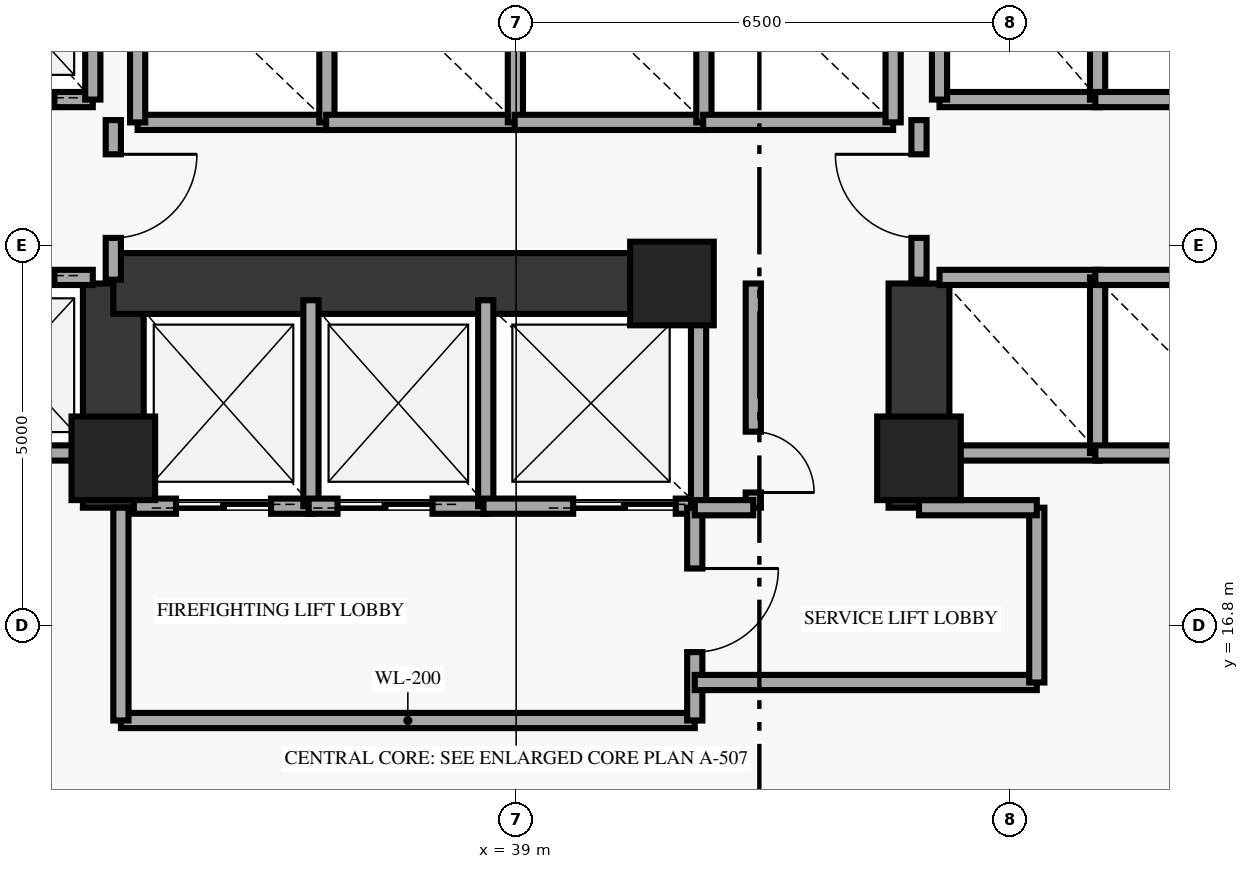
"""IFC4 building model, lengths in metres.
Left out: names, types, materials, properties, quantities, classifications, styles, units other than length and angle.
Written with IfcOpenShell. Run it as: python <this file> out.ifc"""

import sys

from ifc_helpers import new_model, si_unit, direction, frame, frame_2d, origin, origin_2d, place, context, subcontext, project, spatial, rectangle, extrude, element, fill, save


model = new_model("IFC4")
c1 = context("Model", 3, precision=1e-05, world=origin(), true_north=direction((0.0, 1.0)))
c2 = subcontext(c1, "Body", "Model", "MODEL_VIEW")
j1 = project(units=[si_unit("LENGTHUNIT", "METRE"), si_unit("PLANEANGLEUNIT", "RADIAN")], contexts=[c1])
p1 = place(None, origin())
s1 = spatial("IfcSite", under=j1, at=p1, CompositionType="ELEMENT")
p2 = place(p1, origin())
s2 = spatial("IfcBuilding", under=s1, at=p2, CompositionType="ELEMENT")
p3 = place(p2, frame((0.0, 0.0, 21.0)))
s3 = spatial("IfcBuildingStorey", under=s2, at=p3, CompositionType="ELEMENT", Elevation=21.0)
for number, where, z_axis, x_axis in (
    (1, (33.7, 19.0, 0.0), (0.0, 0.0, 1.0), (1.0, 0.0, 0.0)),
    (2, (41.05, 21.3, 0.0), (0.0, 0.0, 1.0), (1.0, 0.0, 0.0)),
    (3, (44.3, 19.0, 0.0), (0.0, 0.0, 1.0), (1.0, 0.0, 0.0)),
):
    element("IfcColumn", number, at=place(p3, frame(where, z_axis=z_axis, x_axis=x_axis)), inside=s3, PredefinedType="PILASTER", context=c2, shape_type="SweptSolid", body=[
        extrude(rectangle(XDim=1.1, YDim=1.1, at=origin_2d()), origin(), (0.0, 0.0, 1.0), 3.79),
    ])
for number, where, z_axis, x_axis in (
    (4, (33.7, 18.35, 0.0), (0.0, 0.0, 1.0), (0.0, 1.0, 0.0)),
    (5, (44.3, 18.35, 0.0), (0.0, 0.0, 1.0), (0.0, 1.0, 0.0)),
):
    element("IfcWall", number, at=place(p3, frame(where, z_axis=z_axis, x_axis=x_axis)), inside=s3, PredefinedType="SHEAR", context=c2, shape_type="SweptSolid", body=[
        extrude(rectangle(XDim=2.95, YDim=0.8, at=frame_2d((1.475, 0.0))), origin(), (0.0, 0.0, 1.0), 3.79),
    ])
p4 = place(p3, frame((33.7, 21.3, 0.0), z_axis=(0.0, 0.0, 1.0), x_axis=(1.0, 0.0, 0.0)))
e6 = element("IfcWall", 6, at=p4, inside=s3, PredefinedType="SHEAR", context=c2, shape_type="SweptSolid", body=[
    extrude(rectangle(XDim=7.55, YDim=0.8, at=frame_2d((3.775, 0.0))), origin(), (0.0, 0.0, 1.0), 3.79),
])
p5 = place(p3, frame((31.32, 23.72, 0.0), z_axis=(0.0, 0.0, 1.0), x_axis=(1.0, 0.0, 0.0)))
e7 = element("IfcWall", 7, at=p5, inside=s3, PredefinedType="SOLIDWALL", context=c2, shape_type="SweptSolid", body=[
    extrude(rectangle(XDim=2.11, YDim=0.2, at=frame_2d((1.055, 0.0))), origin(), (0.0, 0.0, 1.0), 3.79),
])
p6 = place(p5, frame((0.505, 0.0, 0.0)))
e8 = element("IfcOpeningElement", 8, at=p6, cuts=e7, PredefinedType="OPENING", context=c2, shape_type="SweptSolid", body=[
    extrude(rectangle(XDim=1.1, YDim=2.15, at=frame_2d((0.55, 1.075))), frame((0.0, 0.11, 0.0), z_axis=(0.0, -1.0, 0.0), x_axis=(1.0, 0.0, 0.0)), (0.0, 0.0, 1.0), 0.22),
])
p7 = place(p3, frame((33.43, 23.72, 0.0), z_axis=(0.0, 0.0, 1.0), x_axis=(0.0, 1.0, 0.0)))
e9 = element("IfcWall", 9, at=p7, inside=s3, PredefinedType="SOLIDWALL", context=c2, shape_type="SweptSolid", body=[
    extrude(rectangle(XDim=2.41, YDim=0.2, at=frame_2d((1.205, 0.0))), origin(), (0.0, 0.0, 1.0), 3.79),
])
p8 = place(p3, frame((31.32, 19.07, 0.0), z_axis=(0.0, 0.0, 1.0), x_axis=(1.0, 0.0, 0.0)))
e10 = element("IfcWall", 10, at=p8, inside=s3, PredefinedType="SOLIDWALL", context=c2, shape_type="SweptSolid", body=[
    extrude(rectangle(XDim=2.11, YDim=0.2, at=frame_2d((1.055, 0.0))), origin(), (0.0, 0.0, 1.0), 3.79),
])
p9 = place(p3, frame((31.32, 21.38, 0.0), z_axis=(0.0, 0.0, 1.0), x_axis=(1.0, 0.0, 0.0)))
e11 = element("IfcWall", 11, at=p9, inside=s3, PredefinedType="SOLIDWALL", context=c2, shape_type="SweptSolid", body=[
    extrude(rectangle(XDim=2.11, YDim=0.2, at=frame_2d((1.055, 0.0))), origin(), (0.0, 0.0, 1.0), 3.79),
])
p10 = place(p9, frame((0.505, 0.0, 0.0)))
e12 = element("IfcOpeningElement", 12, at=p10, cuts=e11, PredefinedType="OPENING", context=c2, shape_type="SweptSolid", body=[
    extrude(rectangle(XDim=1.1, YDim=2.15, at=frame_2d((0.55, 1.075))), frame((0.0, 0.11, 0.0), z_axis=(0.0, -1.0, 0.0), x_axis=(1.0, 0.0, 0.0)), (0.0, 0.0, 1.0), 0.22),
])
p11 = place(p3, frame((44.57, 23.72, 0.0), z_axis=(0.0, 0.0, 1.0), x_axis=(1.0, 0.0, 0.0)))
e13 = element("IfcWall", 13, at=p11, inside=s3, PredefinedType="SOLIDWALL", context=c2, shape_type="SweptSolid", body=[
    extrude(rectangle(XDim=2.11, YDim=0.2, at=frame_2d((1.055, 0.0))), origin(), (0.0, 0.0, 1.0), 3.79),
])
for number, where, z_axis, x_axis in (
    (14, (44.57, 23.72, 0.0), (0.0, 0.0, 1.0), (0.0, 1.0, 0.0)),
    (15, (46.65, 23.72, 0.0), (0.0, 0.0, 1.0), (0.0, 1.0, 0.0)),
):
    element("IfcWall", number, at=place(p3, frame(where, z_axis=z_axis, x_axis=x_axis)), inside=s3, PredefinedType="SOLIDWALL", context=c2, shape_type="SweptSolid", body=[
        extrude(rectangle(XDim=2.41, YDim=0.2, at=frame_2d((1.205, 0.0))), origin(), (0.0, 0.0, 1.0), 3.79),
    ])
p12 = place(p3, frame((46.62, 23.72, 0.0), z_axis=(0.0, 0.0, 1.0), x_axis=(1.0, 0.0, 0.0)))
e16 = element("IfcWall", 16, at=p12, inside=s3, PredefinedType="SOLIDWALL", context=c2, shape_type="SweptSolid", body=[
    extrude(rectangle(XDim=2.31, YDim=0.2, at=frame_2d((1.155, 0.0))), origin(), (0.0, 0.0, 1.0), 3.79),
])
for number, where, z_axis, x_axis in (
    (17, (44.57, 19.07, 0.0), (0.0, 0.0, 1.0), (1.0, 0.0, 0.0)),
    (18, (44.57, 21.38, 0.0), (0.0, 0.0, 1.0), (1.0, 0.0, 0.0)),
):
    element("IfcWall", number, at=place(p3, frame(where, z_axis=z_axis, x_axis=x_axis)), inside=s3, PredefinedType="SOLIDWALL", context=c2, shape_type="SweptSolid", body=[
        extrude(rectangle(XDim=2.11, YDim=0.2, at=frame_2d((1.055, 0.0))), origin(), (0.0, 0.0, 1.0), 3.79),
    ])
for number, where, z_axis, x_axis in (
    (19, (46.65, 19.07, 0.0), (0.0, 0.0, 1.0), (0.0, 1.0, 0.0)),
    (20, (46.62, 19.07, 0.0), (0.0, 0.0, 1.0), (1.0, 0.0, 0.0)),
    (21, (46.62, 21.38, 0.0), (0.0, 0.0, 1.0), (1.0, 0.0, 0.0)),
):
    element("IfcWall", number, at=place(p3, frame(where, z_axis=z_axis, x_axis=x_axis)), inside=s3, PredefinedType="SOLIDWALL", context=c2, shape_type="SweptSolid", body=[
        extrude(rectangle(XDim=2.31, YDim=0.2, at=frame_2d((1.155, 0.0))), origin(), (0.0, 0.0, 1.0), 3.79),
    ])
p13 = place(p3, frame((34.02, 23.42, 0.0), z_axis=(0.0, 0.0, 1.0), x_axis=(1.0, 0.0, 0.0)))
e22 = element("IfcWall", 22, at=p13, inside=s3, PredefinedType="SOLIDWALL", context=c2, shape_type="SweptSolid", body=[
    extrude(rectangle(XDim=2.5, YDim=0.2, at=frame_2d((1.25, 0.0))), origin(), (0.0, 0.0, 1.0), 3.79),
])
for number, where, z_axis, x_axis in (
    (23, (34.02, 23.42, 0.0), (0.0, 0.0, 1.0), (0.0, 1.0, 0.0)),
    (24, (36.51, 23.42, 0.0), (0.0, 0.0, 1.0), (0.0, 1.0, 0.0)),
):
    element("IfcWall", number, at=place(p3, frame(where, z_axis=z_axis, x_axis=x_axis)), inside=s3, PredefinedType="SOLIDWALL", context=c2, shape_type="SweptSolid", body=[
        extrude(rectangle(XDim=2.41, YDim=0.2, at=frame_2d((1.205, 0.0))), origin(), (0.0, 0.0, 1.0), 3.79),
    ])
p14 = place(p3, frame((36.5, 23.42, 0.0), z_axis=(0.0, 0.0, 1.0), x_axis=(1.0, 0.0, 0.0)))
e25 = element("IfcWall", 25, at=p14, inside=s3, PredefinedType="SOLIDWALL", context=c2, shape_type="SweptSolid", body=[
    extrude(rectangle(XDim=2.5, YDim=0.2, at=frame_2d((1.25, 0.0))), origin(), (0.0, 0.0, 1.0), 3.79),
])
p15 = place(p3, frame((38.99, 23.42, 0.0), z_axis=(0.0, 0.0, 1.0), x_axis=(0.0, 1.0, 0.0)))
e26 = element("IfcWall", 26, at=p15, inside=s3, PredefinedType="SOLIDWALL", context=c2, shape_type="SweptSolid", body=[
    extrude(rectangle(XDim=2.41, YDim=0.2, at=frame_2d((1.205, 0.0))), origin(), (0.0, 0.0, 1.0), 3.79),
])
p16 = place(p3, frame((38.98, 23.42, 0.0), z_axis=(0.0, 0.0, 1.0), x_axis=(1.0, 0.0, 0.0)))
e27 = element("IfcWall", 27, at=p16, inside=s3, PredefinedType="SOLIDWALL", context=c2, shape_type="SweptSolid", body=[
    extrude(rectangle(XDim=2.5, YDim=0.2, at=frame_2d((1.25, 0.0))), origin(), (0.0, 0.0, 1.0), 3.79),
])
p17 = place(p3, frame((41.47, 23.42, 0.0), z_axis=(0.0, 0.0, 1.0), x_axis=(0.0, 1.0, 0.0)))
e28 = element("IfcWall", 28, at=p17, inside=s3, PredefinedType="SOLIDWALL", context=c2, shape_type="SweptSolid", body=[
    extrude(rectangle(XDim=2.41, YDim=0.2, at=frame_2d((1.205, 0.0))), origin(), (0.0, 0.0, 1.0), 3.79),
])
p18 = place(p3, frame((41.46, 23.42, 0.0), z_axis=(0.0, 0.0, 1.0), x_axis=(1.0, 0.0, 0.0)))
e29 = element("IfcWall", 29, at=p18, inside=s3, PredefinedType="SOLIDWALL", context=c2, shape_type="SweptSolid", body=[
    extrude(rectangle(XDim=2.5, YDim=0.2, at=frame_2d((1.25, 0.0))), origin(), (0.0, 0.0, 1.0), 3.79),
])
p19 = place(p3, frame((43.96, 23.42, 0.0), z_axis=(0.0, 0.0, 1.0), x_axis=(0.0, 1.0, 0.0)))
e30 = element("IfcWall", 30, at=p19, inside=s3, PredefinedType="SOLIDWALL", context=c2, shape_type="SweptSolid", body=[
    extrude(rectangle(XDim=2.41, YDim=0.2, at=frame_2d((1.205, 0.0))), origin(), (0.0, 0.0, 1.0), 3.79),
])
p20 = place(p3, frame((33.97, 18.37, 0.0), z_axis=(0.0, 0.0, 1.0), x_axis=(1.0, 0.0, 0.0)))
e31 = element("IfcWall", 31, at=p20, inside=s3, PredefinedType="SOLIDWALL", context=c2, shape_type="SweptSolid", body=[
    extrude(rectangle(XDim=2.36, YDim=0.2, at=frame_2d((1.18, 0.0))), origin(), (0.0, 0.0, 1.0), 3.79),
])
p21 = place(p20, frame((0.555, 0.0, 0.0)))
e32 = element("IfcOpeningElement", 32, at=p21, cuts=e31, PredefinedType="OPENING", context=c2, shape_type="SweptSolid", body=[
    extrude(rectangle(XDim=1.25, YDim=2.2, at=frame_2d((0.625, 1.1))), frame((0.0, 0.11, 0.0), z_axis=(0.0, -1.0, 0.0), x_axis=(1.0, 0.0, 0.0)), (0.0, 0.0, 1.0), 0.22),
])
p22 = place(p3, frame((36.3, 18.37, 0.0), z_axis=(0.0, 0.0, 1.0), x_axis=(0.0, 1.0, 0.0)))
e33 = element("IfcWall", 33, at=p22, inside=s3, PredefinedType="SOLIDWALL", context=c2, shape_type="SweptSolid", body=[
    extrude(rectangle(XDim=2.71, YDim=0.2, at=frame_2d((1.355, 0.0))), origin(), (0.0, 0.0, 1.0), 3.79),
])
p23 = place(p3, frame((36.27, 18.37, 0.0), z_axis=(0.0, 0.0, 1.0), x_axis=(1.0, 0.0, 0.0)))
e34 = element("IfcWall", 34, at=p23, inside=s3, PredefinedType="SOLIDWALL", context=c2, shape_type="SweptSolid", body=[
    extrude(rectangle(XDim=2.36, YDim=0.2, at=frame_2d((1.18, 0.0))), origin(), (0.0, 0.0, 1.0), 3.79),
])
p24 = place(p23, frame((0.38, 0.0, 0.0)))
e35 = element("IfcOpeningElement", 35, at=p24, cuts=e34, PredefinedType="OPENING", context=c2, shape_type="SweptSolid", body=[
    extrude(rectangle(XDim=1.25, YDim=2.2, at=frame_2d((0.625, 1.1))), frame((0.0, 0.11, 0.0), z_axis=(0.0, -1.0, 0.0), x_axis=(1.0, 0.0, 0.0)), (0.0, 0.0, 1.0), 0.22),
])
p25 = place(p3, frame((38.6, 18.37, 0.0), z_axis=(0.0, 0.0, 1.0), x_axis=(0.0, 1.0, 0.0)))
e36 = element("IfcWall", 36, at=p25, inside=s3, PredefinedType="SOLIDWALL", context=c2, shape_type="SweptSolid", body=[
    extrude(rectangle(XDim=2.71, YDim=0.2, at=frame_2d((1.355, 0.0))), origin(), (0.0, 0.0, 1.0), 3.79),
])
p26 = place(p3, frame((38.57, 18.37, 0.0), z_axis=(0.0, 0.0, 1.0), x_axis=(1.0, 0.0, 0.0)))
e37 = element("IfcWall", 37, at=p26, inside=s3, PredefinedType="SOLIDWALL", context=c2, shape_type="SweptSolid", body=[
    extrude(rectangle(XDim=2.83, YDim=0.2, at=frame_2d((1.415, 0.0))), origin(), (0.0, 0.0, 1.0), 3.79),
])
p27 = place(p26, frame((1.18, 0.0, 0.0)))
e38 = element("IfcOpeningElement", 38, at=p27, cuts=e37, PredefinedType="OPENING", context=c2, shape_type="SweptSolid", body=[
    extrude(rectangle(XDim=1.35, YDim=2.18, at=frame_2d((0.675, 1.09))), frame((0.0, 0.11, 0.0), z_axis=(0.0, -1.0, 0.0), x_axis=(1.0, 0.0, 0.0)), (0.0, 0.0, 1.0), 0.22),
])
p28 = place(p3, frame((41.4, 18.37, 0.0), z_axis=(0.0, 0.0, 1.0), x_axis=(0.0, 1.0, 0.0)))
e39 = element("IfcWall", 39, at=p28, inside=s3, PredefinedType="SOLIDWALL", context=c2, shape_type="SweptSolid", body=[
    extrude(rectangle(XDim=2.71, YDim=0.2, at=frame_2d((1.355, 0.0))), origin(), (0.0, 0.0, 1.0), 3.79),
])
p29 = place(p3, frame((33.7, 21.35, 0.0), z_axis=(0.0, 0.0, 1.0), x_axis=(0.0, 1.0, 0.0)))
e40 = element("IfcWall", 40, at=p29, inside=s3, PredefinedType="SOLIDWALL", context=c2, shape_type="SweptSolid", body=[
    extrude(rectangle(XDim=2.1, YDim=0.2, at=frame_2d((1.05, 0.0))), origin(), (0.0, 0.0, 1.0), 3.01),
])
p30 = place(p29, frame((0.55, 0.0, 0.0)))
e41 = element("IfcOpeningElement", 41, at=p30, cuts=e40, PredefinedType="OPENING", context=c2, shape_type="SweptSolid", body=[
    extrude(rectangle(XDim=1.1, YDim=2.15, at=frame_2d((0.55, 1.075))), frame((0.0, 0.11, 0.0), z_axis=(0.0, -1.0, 0.0), x_axis=(1.0, 0.0, 0.0)), (0.0, 0.0, 1.0), 0.22),
])
p31 = place(p3, frame((44.3, 21.35, 0.0), z_axis=(0.0, 0.0, 1.0), x_axis=(0.0, 1.0, 0.0)))
e42 = element("IfcWall", 42, at=p31, inside=s3, PredefinedType="SOLIDWALL", context=c2, shape_type="SweptSolid", body=[
    extrude(rectangle(XDim=2.1, YDim=0.2, at=frame_2d((1.05, 0.0))), origin(), (0.0, 0.0, 1.0), 3.01),
])
p32 = place(p31, frame((0.55, 0.0, 0.0)))
e43 = element("IfcOpeningElement", 43, at=p32, cuts=e42, PredefinedType="OPENING", context=c2, shape_type="SweptSolid", body=[
    extrude(rectangle(XDim=1.1, YDim=2.15, at=frame_2d((0.55, 1.075))), frame((0.0, 0.11, 0.0), z_axis=(0.0, -1.0, 0.0), x_axis=(1.0, 0.0, 0.0)), (0.0, 0.0, 1.0), 0.22),
])
p33 = place(p3, frame((33.8, 15.55, 0.0), z_axis=(0.0, 0.0, 1.0), x_axis=(1.0, 0.0, 0.0)))
e44 = element("IfcWall", 44, at=p33, inside=s3, PredefinedType="SOLIDWALL", context=c2, shape_type="SweptSolid", body=[
    extrude(rectangle(XDim=7.55, YDim=0.2, at=frame_2d((3.775, 0.0))), origin(), (0.0, 0.0, 1.0), 3.79),
])
p34 = place(p3, frame((33.8, 15.55, 0.0), z_axis=(0.0, 0.0, 1.0), x_axis=(0.0, 1.0, 0.0)))
e45 = element("IfcWall", 45, at=p34, inside=s3, PredefinedType="SOLIDWALL", context=c2, shape_type="SweptSolid", body=[
    extrude(rectangle(XDim=2.8, YDim=0.2, at=frame_2d((1.4, 0.0))), origin(), (0.0, 0.0, 1.0), 3.79),
])
p35 = place(p3, frame((41.35, 15.55, 0.0), z_axis=(0.0, 0.0, 1.0), x_axis=(0.0, 1.0, 0.0)))
e46 = element("IfcWall", 46, at=p35, inside=s3, PredefinedType="SOLIDWALL", context=c2, shape_type="SweptSolid", body=[
    extrude(rectangle(XDim=2.8, YDim=0.2, at=frame_2d((1.4, 0.0))), origin(), (0.0, 0.0, 1.0), 3.79),
])
p36 = place(p35, frame((0.9, 0.0, 0.0)))
e47 = element("IfcOpeningElement", 47, at=p36, cuts=e46, PredefinedType="OPENING", context=c2, shape_type="SweptSolid", body=[
    extrude(rectangle(XDim=1.1, YDim=2.15, at=frame_2d((0.55, 1.075))), frame((0.0, 0.11, 0.0), z_axis=(0.0, -1.0, 0.0), x_axis=(1.0, 0.0, 0.0)), (0.0, 0.0, 1.0), 0.22),
])
p37 = place(p3, frame((41.35, 16.05, 0.0), z_axis=(0.0, 0.0, 1.0), x_axis=(1.0, 0.0, 0.0)))
e48 = element("IfcWall", 48, at=p37, inside=s3, PredefinedType="SOLIDWALL", context=c2, shape_type="SweptSolid", body=[
    extrude(rectangle(XDim=4.5, YDim=0.2, at=frame_2d((2.25, 0.0))), origin(), (0.0, 0.0, 1.0), 3.79),
])
p38 = place(p3, frame((45.85, 16.05, 0.0), z_axis=(0.0, 0.0, 1.0), x_axis=(0.0, 1.0, 0.0)))
e49 = element("IfcWall", 49, at=p38, inside=s3, PredefinedType="SOLIDWALL", context=c2, shape_type="SweptSolid", body=[
    extrude(rectangle(XDim=2.3, YDim=0.2, at=frame_2d((1.15, 0.0))), origin(), (0.0, 0.0, 1.0), 3.79),
])
p39 = place(p3, frame((44.3, 18.35, 0.0), z_axis=(0.0, 0.0, 1.0), x_axis=(1.0, 0.0, 0.0)))
e50 = element("IfcWall", 50, at=p39, inside=s3, PredefinedType="SOLIDWALL", context=c2, shape_type="SweptSolid", body=[
    extrude(rectangle(XDim=1.55, YDim=0.2, at=frame_2d((0.775, 0.0))), origin(), (0.0, 0.0, 1.0), 3.79),
])
p40 = place(p3, frame((42.12, 18.35, 0.0), z_axis=(0.0, 0.0, 1.0), x_axis=(0.0, 1.0, 0.0)))
e51 = element("IfcWall", 51, at=p40, inside=s3, PredefinedType="SOLIDWALL", context=c2, shape_type="SweptSolid", body=[
    extrude(rectangle(XDim=2.95, YDim=0.2, at=frame_2d((1.475, 0.0))), origin(), (0.0, 0.0, 1.0), 3.79),
])
p41 = place(p40, frame((0.2, 0.0, 0.0)))
e52 = element("IfcOpeningElement", 52, at=p41, cuts=e51, PredefinedType="OPENING", context=c2, shape_type="SweptSolid", body=[
    extrude(rectangle(XDim=0.8, YDim=2.05, at=frame_2d((0.4, 1.025))), frame((0.0, 0.11, 0.0), z_axis=(0.0, -1.0, 0.0), x_axis=(1.0, 0.0, 0.0)), (0.0, 0.0, 1.0), 0.22),
])
p42 = place(p3, frame((41.35, 18.35, 0.0), z_axis=(0.0, 0.0, 1.0), x_axis=(1.0, 0.0, 0.0)))
e53 = element("IfcWall", 53, at=p42, inside=s3, PredefinedType="SOLIDWALL", context=c2, shape_type="SweptSolid", body=[
    extrude(rectangle(XDim=0.77, YDim=0.2, at=frame_2d((0.385, 0.0))), origin(), (0.0, 0.0, 1.0), 3.79),
])
p43 = place(p3, frame((29.286, 15.418, 0.0), z_axis=(0.0, 0.0, 1.0), x_axis=(0.898437278598, -0.439101874768, 0.0)))
e54 = element("IfcWall", 54, at=p43, inside=s3, PredefinedType="PARTITIONING", context=c2, shape_type="SweptSolid", body=[
    extrude(rectangle(XDim=7.119, YDim=0.16, at=frame_2d((3.56, 0.0))), origin(), (0.0, 0.0, 1.0), 3.79),
])
p44 = place(p3, frame((45.852, 12.895, 0.0), z_axis=(0.0, 0.0, 1.0), x_axis=(0.75014962781, 0.661268127083, 0.0)))
e55 = element("IfcWall", 55, at=p44, inside=s3, PredefinedType="PARTITIONING", context=c2, shape_type="SweptSolid", body=[
    extrude(rectangle(XDim=3.815, YDim=0.16, at=frame_2d((1.908, 0.0))), origin(), (0.0, 0.0, 1.0), 3.79),
])
p45 = place(p6, origin())
e56 = element("IfcDoor", 56, at=p45, inside=s3, OperationType="DOUBLE_DOOR_SLIDING", PredefinedType="DOOR", context=c2, shape_type="SweptSolid", body=[
    extrude(rectangle(XDim=1.1, YDim=2.15, at=frame_2d((0.55, 1.075))), frame((0.0, 0.025, 0.0), z_axis=(0.0, -1.0, 0.0), x_axis=(1.0, 0.0, 0.0)), (0.0, 0.0, 1.0), 0.05),
])
fill(e8, e56)
p46 = place(p10, origin())
e57 = element("IfcDoor", 57, at=p46, inside=s3, OperationType="DOUBLE_DOOR_SLIDING", PredefinedType="DOOR", context=c2, shape_type="SweptSolid", body=[
    extrude(rectangle(XDim=1.1, YDim=2.15, at=frame_2d((0.55, 1.075))), frame((0.0, 0.025, 0.0), z_axis=(0.0, -1.0, 0.0), x_axis=(1.0, 0.0, 0.0)), (0.0, 0.0, 1.0), 0.05),
])
fill(e12, e57)
p47 = place(p21, origin())
e58 = element("IfcDoor", 58, at=p47, inside=s3, OperationType="DOUBLE_DOOR_SLIDING", PredefinedType="DOOR", context=c2, shape_type="SweptSolid", body=[
    extrude(rectangle(XDim=1.25, YDim=2.2, at=frame_2d((0.625, 1.1))), frame((0.0, 0.025, 0.0), z_axis=(0.0, -1.0, 0.0), x_axis=(1.0, 0.0, 0.0)), (0.0, 0.0, 1.0), 0.05),
])
fill(e32, e58)
p48 = place(p24, origin())
e59 = element("IfcDoor", 59, at=p48, inside=s3, OperationType="DOUBLE_DOOR_SLIDING", PredefinedType="DOOR", context=c2, shape_type="SweptSolid", body=[
    extrude(rectangle(XDim=1.25, YDim=2.2, at=frame_2d((0.625, 1.1))), frame((0.0, 0.025, 0.0), z_axis=(0.0, -1.0, 0.0), x_axis=(1.0, 0.0, 0.0)), (0.0, 0.0, 1.0), 0.05),
])
fill(e35, e59)
p49 = place(p27, origin())
e60 = element("IfcDoor", 60, at=p49, inside=s3, OperationType="DOUBLE_DOOR_SLIDING", PredefinedType="DOOR", context=c2, shape_type="SweptSolid", body=[
    extrude(rectangle(XDim=1.35, YDim=2.18, at=frame_2d((0.675, 1.09))), frame((0.0, 0.025, 0.0), z_axis=(0.0, -1.0, 0.0), x_axis=(1.0, 0.0, 0.0)), (0.0, 0.0, 1.0), 0.05),
])
fill(e38, e60)
p50 = place(p30, origin())
e61 = element("IfcDoor", 61, at=p50, inside=s3, OperationType="SINGLE_SWING_RIGHT", PredefinedType="DOOR", context=c2, shape_type="SweptSolid", body=[
    extrude(rectangle(XDim=1.1, YDim=2.15, at=frame_2d((0.55, 1.075))), frame((0.0, 0.025, 0.0), z_axis=(0.0, -1.0, 0.0), x_axis=(1.0, 0.0, 0.0)), (0.0, 0.0, 1.0), 0.05),
])
fill(e41, e61)
p51 = place(p32, origin())
e62 = element("IfcDoor", 62, at=p51, inside=s3, OperationType="SINGLE_SWING_RIGHT", PredefinedType="DOOR", context=c2, shape_type="SweptSolid", body=[
    extrude(rectangle(XDim=1.1, YDim=2.15, at=frame_2d((0.55, 1.075))), frame((0.0, 0.025, 0.0), z_axis=(0.0, -1.0, 0.0), x_axis=(1.0, 0.0, 0.0)), (0.0, 0.0, 1.0), 0.05),
])
fill(e43, e62)
p52 = place(p36, origin())
e63 = element("IfcDoor", 63, at=p52, inside=s3, OperationType="SINGLE_SWING_RIGHT", PredefinedType="DOOR", context=c2, shape_type="SweptSolid", body=[
    extrude(rectangle(XDim=1.1, YDim=2.15, at=frame_2d((0.55, 1.075))), frame((0.0, 0.025, 0.0), z_axis=(0.0, -1.0, 0.0), x_axis=(1.0, 0.0, 0.0)), (0.0, 0.0, 1.0), 0.05),
])
fill(e47, e63)
p53 = place(p41, origin())
e64 = element("IfcDoor", 64, at=p53, inside=s3, OperationType="SINGLE_SWING_LEFT", PredefinedType="DOOR", context=c2, shape_type="SweptSolid", body=[
    extrude(rectangle(XDim=0.8, YDim=2.05, at=frame_2d((0.4, 1.025))), frame((0.0, 0.025, 0.0), z_axis=(0.0, -1.0, 0.0), x_axis=(1.0, 0.0, 0.0)), (0.0, 0.0, 1.0), 0.05),
])
fill(e52, e64)
save(model, sys.argv[1])
